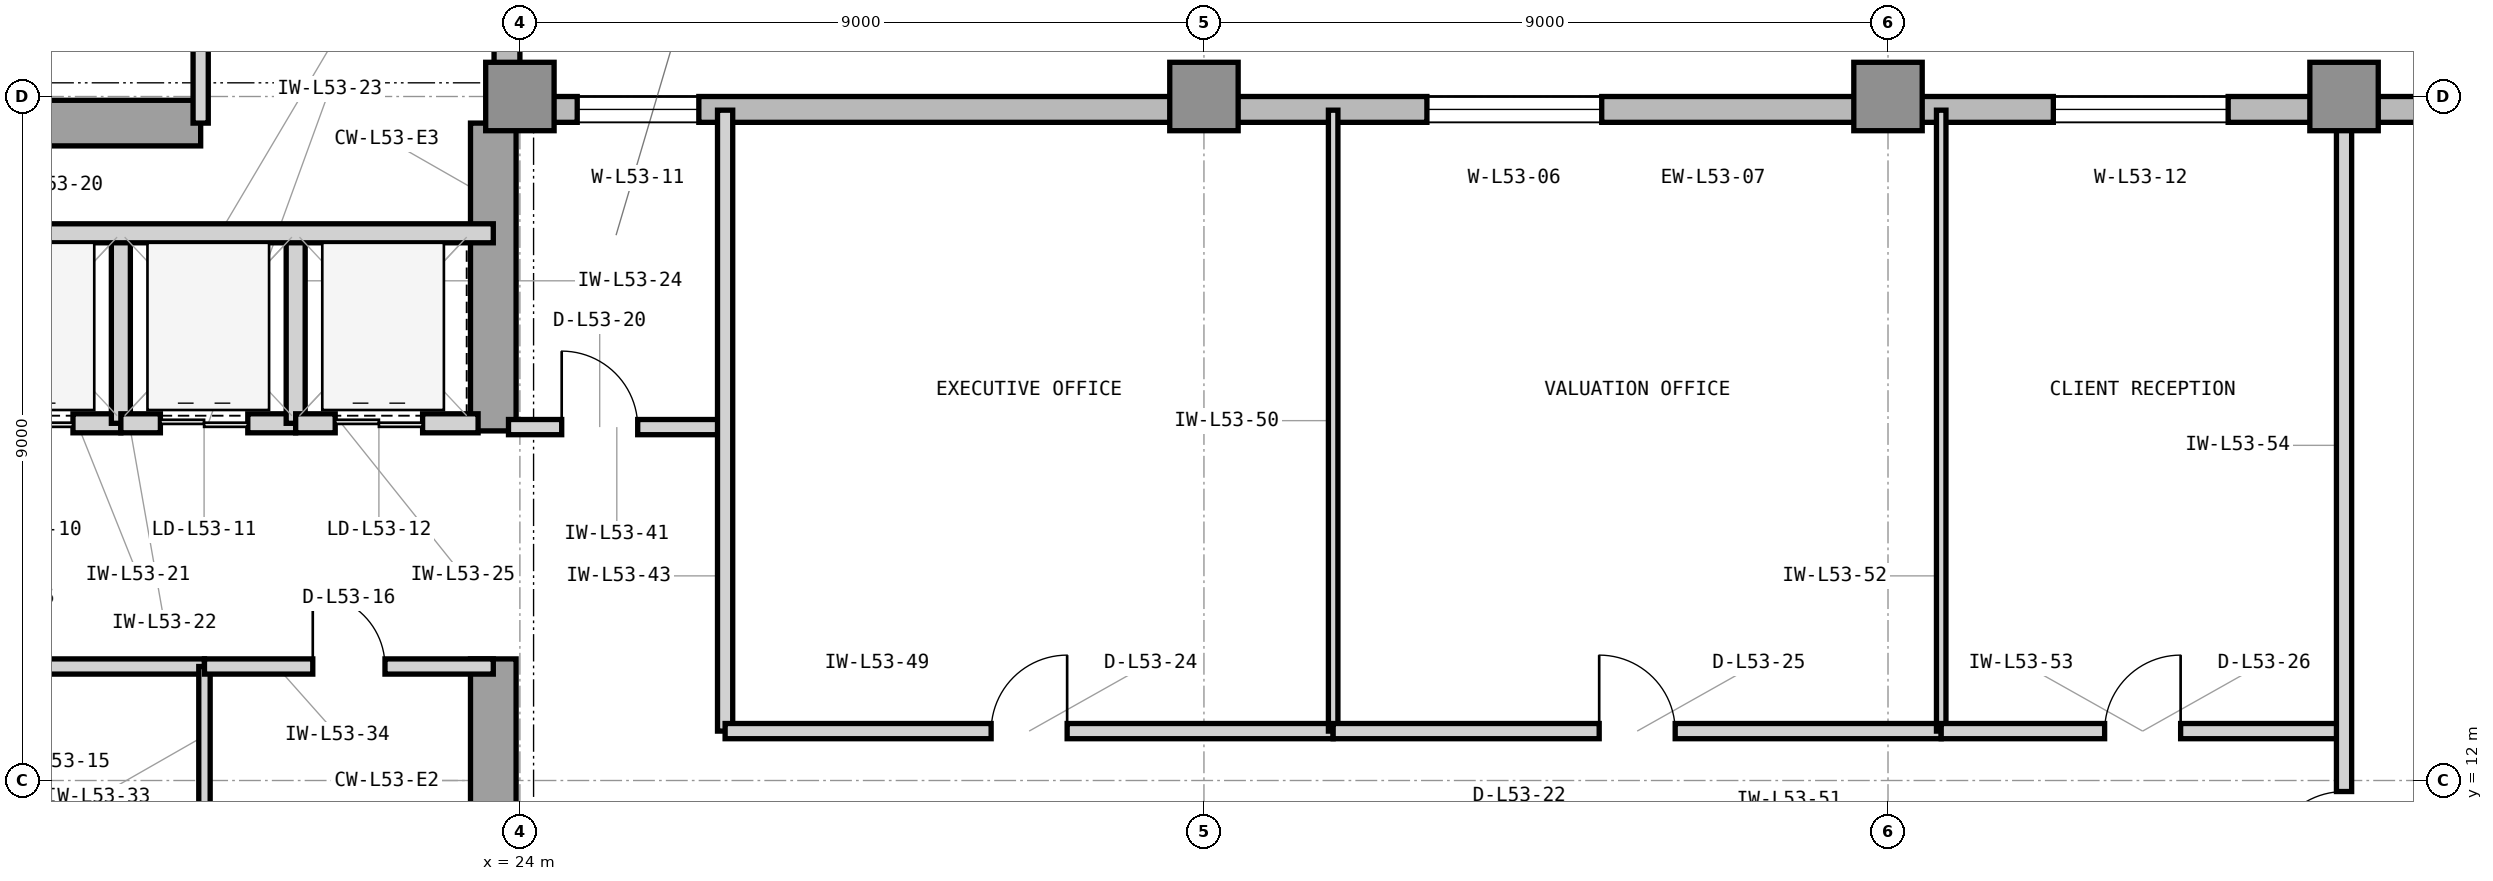
"""IFC4 building model, lengths in metres.
Left out: names, types, materials, properties, quantities, classifications, styles, units other than length and angle.
Written with IfcOpenShell. Run it as: python <this file> out.ifc"""

import sys

from ifc_helpers import new_model, si_unit, direction, frame, frame_2d, origin, origin_2d, place, context, subcontext, project, spatial, rectangle, extrude, element, fill, save


model = new_model("IFC4")
c1 = context("Model", 3, precision=1e-05, world=origin(), true_north=direction((0.0, 1.0)))
c2 = subcontext(c1, "Body", "Model", "MODEL_VIEW")
j1 = project(units=[si_unit("LENGTHUNIT", "METRE"), si_unit("PLANEANGLEUNIT", "RADIAN")], contexts=[c1])
p1 = place(None, origin())
s1 = spatial("IfcSite", under=j1, at=p1, CompositionType="ELEMENT")
p2 = place(p1, origin())
s2 = spatial("IfcBuilding", under=s1, at=p2, CompositionType="ELEMENT")
p3 = place(p2, frame((0.0, 0.0, 219.0)))
s3 = spatial("IfcBuildingStorey", under=s2, at=p3, CompositionType="ELEMENT", Elevation=219.0)
p4 = place(p3, frame((7.475, 20.65, 0.0), z_axis=(0.0, 0.0, 1.0), x_axis=(1.0, 0.0, 0.0)))
e1 = element("IfcWall", 1, at=p4, inside=s3, PredefinedType="SHEAR", context=c2, shape_type="SweptSolid", body=[
    extrude(rectangle(XDim=12.325, YDim=0.6, at=frame_2d((6.163, 0.0))), origin(), (0.0, 0.0, 1.0), 3.9),
])
p5 = place(p3, frame((23.65, 10.4, 0.0), z_axis=(0.0, 0.0, 1.0), x_axis=(0.0, 1.0, 0.0)))
e2 = element("IfcWall", 2, at=p5, inside=s3, PredefinedType="SHEAR", context=c2, shape_type="SweptSolid", body=[
    extrude(rectangle(XDim=3.2, YDim=0.6, at=frame_2d((1.6, 0.0))), origin(), (0.0, 0.0, 1.0), 3.9),
])
p6 = place(p3, frame((23.65, 16.6, 0.0), z_axis=(0.0, 0.0, 1.0), x_axis=(0.0, 1.0, 0.0)))
e3 = element("IfcWall", 3, at=p6, inside=s3, PredefinedType="SHEAR", context=c2, shape_type="SweptSolid", body=[
    extrude(rectangle(XDim=4.05, YDim=0.6, at=frame_2d((2.025, 0.0))), origin(), (0.0, 0.0, 1.0), 3.9),
])
for number, where, z_axis, x_axis in (
    (4, (24.0, 21.0, 0.0), (0.0, 0.0, 1.0), (1.0, 0.0, 0.0)),
    (5, (33.0, 21.0, 0.0), (0.0, 0.0, 1.0), (1.0, 0.0, 0.0)),
    (6, (42.0, 21.0, 0.0), (0.0, 0.0, 1.0), (1.0, 0.0, 0.0)),
    (7, (48.0, 21.0, 0.0), (0.0, 0.0, 1.0), (1.0, 0.0, 0.0)),
):
    element("IfcColumn", number, at=place(p3, frame(where, z_axis=z_axis, x_axis=x_axis)), inside=s3, PredefinedType="COLUMN", context=c2, shape_type="SweptSolid", body=[
        extrude(rectangle(XDim=0.9, YDim=0.9, at=origin_2d()), origin(), (0.0, 0.0, 1.0), 3.9),
    ])
p7 = place(p3, frame((55.4, 20.83, 0.0), z_axis=(0.0, 0.0, 1.0), x_axis=(-1.0, 0.0, 0.0)))
e8 = element("IfcWall", 8, at=p7, inside=s3, PredefinedType="STANDARD", context=c2, shape_type="SweptSolid", body=[
    extrude(rectangle(XDim=31.4, YDim=0.34, at=frame_2d((15.7, 0.0))), origin(), (0.0, 0.0, 1.0), 3.65),
])
p8 = place(p7, frame((17.167, 0.0, 0.9)))
e9 = element("IfcOpeningElement", 9, at=p8, cuts=e8, PredefinedType="OPENING", context=c2, shape_type="SweptSolid", body=[
    extrude(rectangle(XDim=2.3, YDim=2.2, at=frame_2d((1.15, 1.1))), frame((0.0, 0.18, 0.0), z_axis=(0.0, -1.0, 0.0), x_axis=(1.0, 0.0, 0.0)), (0.0, 0.0, 1.0), 0.36),
])
p9 = place(p7, frame((29.046, 0.0, 0.9)))
e10 = element("IfcOpeningElement", 10, at=p9, cuts=e8, PredefinedType="OPENING", context=c2, shape_type="SweptSolid", body=[
    extrude(rectangle(XDim=1.6, YDim=2.2, at=frame_2d((0.8, 1.1))), frame((0.0, 0.18, 0.0), z_axis=(0.0, -1.0, 0.0), x_axis=(1.0, 0.0, 0.0)), (0.0, 0.0, 1.0), 0.36),
])
p10 = place(p7, frame((8.925, 0.0, 0.9)))
e11 = element("IfcOpeningElement", 11, at=p10, cuts=e8, PredefinedType="OPENING", context=c2, shape_type="SweptSolid", body=[
    extrude(rectangle(XDim=2.3, YDim=2.2, at=frame_2d((1.15, 1.1))), frame((0.0, 0.18, 0.0), z_axis=(0.0, -1.0, 0.0), x_axis=(1.0, 0.0, 0.0)), (0.0, 0.0, 1.0), 0.36),
])
p11 = place(p3, frame((23.83, 21.0, 0.0), z_axis=(0.0, 0.0, 1.0), x_axis=(0.0, 1.0, 0.0)))
e12 = element("IfcWall", 12, at=p11, inside=s3, PredefinedType="STANDARD", context=c2, shape_type="SweptSolid", body=[
    extrude(rectangle(XDim=19.4, YDim=0.34, at=frame_2d((9.7, 0.0))), origin(), (0.0, 0.0, 1.0), 3.65),
])
p12 = place(p11, frame((10.975, 0.0, 0.9)))
e13 = element("IfcOpeningElement", 13, at=p12, cuts=e12, PredefinedType="OPENING", context=c2, shape_type="SweptSolid", body=[
    extrude(rectangle(XDim=2.3, YDim=2.2, at=frame_2d((1.15, 1.1))), frame((0.0, 0.18, 0.0), z_axis=(0.0, -1.0, 0.0), x_axis=(1.0, 0.0, 0.0)), (0.0, 0.0, 1.0), 0.36),
])
p13 = place(p3, frame((16.45, 16.7, 0.0), z_axis=(0.0, 0.0, 1.0), x_axis=(1.0, 0.0, 0.0)))
e14 = element("IfcWall", 14, at=p13, inside=s3, PredefinedType="PARTITIONING", context=c2, shape_type="SweptSolid", body=[
    extrude(rectangle(XDim=2.3, YDim=0.25, at=frame_2d((1.15, 0.0))), origin(), (0.0, 0.0, 1.0), 3.283),
])
p14 = place(p13, frame((0.52, 0.0, 0.0)))
e15 = element("IfcOpeningElement", 15, at=p14, cuts=e14, PredefinedType="OPENING", context=c2, shape_type="SweptSolid", body=[
    extrude(rectangle(XDim=1.15, YDim=2.25, at=frame_2d((0.575, 1.125))), frame((0.0, 0.135, 0.0), z_axis=(0.0, -1.0, 0.0), x_axis=(1.0, 0.0, 0.0)), (0.0, 0.0, 1.0), 0.27),
])
p15 = place(p3, frame((18.75, 16.7, 0.0), z_axis=(0.0, 0.0, 1.0), x_axis=(0.0, 1.0, 0.0)))
e16 = element("IfcWall", 16, at=p15, inside=s3, PredefinedType="PARTITIONING", context=c2, shape_type="SweptSolid", body=[
    extrude(rectangle(XDim=2.5, YDim=0.25, at=frame_2d((1.25, 0.0))), origin(), (0.0, 0.0, 1.0), 3.64),
])
p16 = place(p3, frame((18.75, 16.7, 0.0), z_axis=(0.0, 0.0, 1.0), x_axis=(1.0, 0.0, 0.0)))
e17 = element("IfcWall", 17, at=p16, inside=s3, PredefinedType="PARTITIONING", context=c2, shape_type="SweptSolid", body=[
    extrude(rectangle(XDim=2.3, YDim=0.25, at=frame_2d((1.15, 0.0))), origin(), (0.0, 0.0, 1.0), 3.283),
])
p17 = place(p16, frame((0.52, 0.0, 0.0)))
e18 = element("IfcOpeningElement", 18, at=p17, cuts=e17, PredefinedType="OPENING", context=c2, shape_type="SweptSolid", body=[
    extrude(rectangle(XDim=1.15, YDim=2.25, at=frame_2d((0.575, 1.125))), frame((0.0, 0.135, 0.0), z_axis=(0.0, -1.0, 0.0), x_axis=(1.0, 0.0, 0.0)), (0.0, 0.0, 1.0), 0.27),
])
p18 = place(p3, frame((21.05, 16.7, 0.0), z_axis=(0.0, 0.0, 1.0), x_axis=(0.0, 1.0, 0.0)))
e19 = element("IfcWall", 19, at=p18, inside=s3, PredefinedType="PARTITIONING", context=c2, shape_type="SweptSolid", body=[
    extrude(rectangle(XDim=2.5, YDim=0.25, at=frame_2d((1.25, 0.0))), origin(), (0.0, 0.0, 1.0), 3.64),
])
p19 = place(p3, frame((21.05, 16.7, 0.0), z_axis=(0.0, 0.0, 1.0), x_axis=(1.0, 0.0, 0.0)))
e20 = element("IfcWall", 20, at=p19, inside=s3, PredefinedType="PARTITIONING", context=c2, shape_type="SweptSolid", body=[
    extrude(rectangle(XDim=2.4, YDim=0.25, at=frame_2d((1.2, 0.0))), origin(), (0.0, 0.0, 1.0), 3.283),
])
p20 = place(p19, frame((0.52, 0.0, 0.0)))
e21 = element("IfcOpeningElement", 21, at=p20, cuts=e20, PredefinedType="OPENING", context=c2, shape_type="SweptSolid", body=[
    extrude(rectangle(XDim=1.15, YDim=2.25, at=frame_2d((0.575, 1.125))), frame((0.0, 0.135, 0.0), z_axis=(0.0, -1.0, 0.0), x_axis=(1.0, 0.0, 0.0)), (0.0, 0.0, 1.0), 0.27),
])
p21 = place(p3, frame((16.45, 19.2, 0.0), z_axis=(0.0, 0.0, 1.0), x_axis=(1.0, 0.0, 0.0)))
e22 = element("IfcWall", 22, at=p21, inside=s3, PredefinedType="PARTITIONING", context=c2, shape_type="SweptSolid", body=[
    extrude(rectangle(XDim=7.2, YDim=0.25, at=frame_2d((3.6, 0.0))), origin(), (0.0, 0.0, 1.0), 3.64),
])
p22 = place(p3, frame((14.7, 13.5, 0.0), z_axis=(0.0, 0.0, 1.0), x_axis=(1.0, 0.0, 0.0)))
e23 = element("IfcWall", 23, at=p22, inside=s3, PredefinedType="PARTITIONING", context=c2, shape_type="SweptSolid", body=[
    extrude(rectangle(XDim=5.15, YDim=0.2, at=frame_2d((2.575, 0.0))), origin(), (0.0, 0.0, 1.0), 3.283),
])
p23 = place(p22, frame((2.1, 0.0, 0.0)))
e24 = element("IfcOpeningElement", 24, at=p23, cuts=e23, PredefinedType="OPENING", context=c2, shape_type="SweptSolid", body=[
    extrude(rectangle(XDim=0.95, YDim=2.1, at=frame_2d((0.475, 1.05))), frame((0.0, 0.11, 0.0), z_axis=(0.0, -1.0, 0.0), x_axis=(1.0, 0.0, 0.0)), (0.0, 0.0, 1.0), 0.22),
])
p24 = place(p3, frame((19.85, 9.85, 0.0), z_axis=(0.0, 0.0, 1.0), x_axis=(0.0, 1.0, 0.0)))
e25 = element("IfcWall", 25, at=p24, inside=s3, PredefinedType="PARTITIONING", context=c2, shape_type="SweptSolid", body=[
    extrude(rectangle(XDim=3.65, YDim=0.15, at=frame_2d((1.825, 0.0))), origin(), (0.0, 0.0, 1.0), 3.64),
])
p25 = place(p3, frame((19.85, 13.5, 0.0), z_axis=(0.0, 0.0, 1.0), x_axis=(1.0, 0.0, 0.0)))
e26 = element("IfcWall", 26, at=p25, inside=s3, PredefinedType="PARTITIONING", context=c2, shape_type="SweptSolid", body=[
    extrude(rectangle(XDim=3.8, YDim=0.2, at=frame_2d((1.9, 0.0))), origin(), (0.0, 0.0, 1.0), 3.283),
])
p26 = place(p25, frame((1.425, 0.0, 0.0)))
e27 = element("IfcOpeningElement", 27, at=p26, cuts=e26, PredefinedType="OPENING", context=c2, shape_type="SweptSolid", body=[
    extrude(rectangle(XDim=0.95, YDim=2.1, at=frame_2d((0.475, 1.05))), frame((0.0, 0.11, 0.0), z_axis=(0.0, -1.0, 0.0), x_axis=(1.0, 0.0, 0.0)), (0.0, 0.0, 1.0), 0.22),
])
p27 = place(p3, frame((23.85, 16.65, 0.0), z_axis=(0.0, 0.0, 1.0), x_axis=(1.0, 0.0, 0.0)))
e28 = element("IfcWall", 28, at=p27, inside=s3, PredefinedType="PARTITIONING", context=c2, shape_type="SweptSolid", body=[
    extrude(rectangle(XDim=2.85, YDim=0.2, at=frame_2d((1.425, 0.0))), origin(), (0.0, 0.0, 1.0), 3.64),
])
p28 = place(p27, frame((0.7, 0.0, 0.0)))
e29 = element("IfcOpeningElement", 29, at=p28, cuts=e28, PredefinedType="OPENING", context=c2, shape_type="SweptSolid", body=[
    extrude(rectangle(XDim=1.0, YDim=2.15, at=frame_2d((0.5, 1.075))), frame((0.0, 0.11, 0.0), z_axis=(0.0, -1.0, 0.0), x_axis=(1.0, 0.0, 0.0)), (0.0, 0.0, 1.0), 0.22),
])
p29 = place(p3, frame((26.7, 12.65, 0.0), z_axis=(0.0, 0.0, 1.0), x_axis=(0.0, 1.0, 0.0)))
e30 = element("IfcWall", 30, at=p29, inside=s3, PredefinedType="PARTITIONING", context=c2, shape_type="SweptSolid", body=[
    extrude(rectangle(XDim=8.17, YDim=0.2, at=frame_2d((4.085, 0.0))), origin(), (0.0, 0.0, 1.0), 3.64),
])
p30 = place(p3, frame((26.7, 12.65, 0.0), z_axis=(0.0, 0.0, 1.0), x_axis=(1.0, 0.0, 0.0)))
e31 = element("IfcWall", 31, at=p30, inside=s3, PredefinedType="PARTITIONING", context=c2, shape_type="SweptSolid", body=[
    extrude(rectangle(XDim=8.0, YDim=0.2, at=frame_2d((4.0, 0.0))), origin(), (0.0, 0.0, 1.0), 3.64),
])
p31 = place(p30, frame((3.5, 0.0, 0.0)))
e32 = element("IfcOpeningElement", 32, at=p31, cuts=e31, PredefinedType="OPENING", context=c2, shape_type="SweptSolid", body=[
    extrude(rectangle(XDim=1.0, YDim=2.15, at=frame_2d((0.5, 1.075))), frame((0.0, 0.11, 0.0), z_axis=(0.0, -1.0, 0.0), x_axis=(1.0, 0.0, 0.0)), (0.0, 0.0, 1.0), 0.22),
])
p32 = place(p3, frame((34.7, 12.65, 0.0), z_axis=(0.0, 0.0, 1.0), x_axis=(0.0, 1.0, 0.0)))
e33 = element("IfcWall", 33, at=p32, inside=s3, PredefinedType="PARTITIONING", context=c2, shape_type="SweptSolid", body=[
    extrude(rectangle(XDim=8.17, YDim=0.125, at=frame_2d((4.085, 0.0))), origin(), (0.0, 0.0, 1.0), 3.64),
])
p33 = place(p3, frame((34.7, 12.65, 0.0), z_axis=(0.0, 0.0, 1.0), x_axis=(1.0, 0.0, 0.0)))
e34 = element("IfcWall", 34, at=p33, inside=s3, PredefinedType="PARTITIONING", context=c2, shape_type="SweptSolid", body=[
    extrude(rectangle(XDim=8.0, YDim=0.2, at=frame_2d((4.0, 0.0))), origin(), (0.0, 0.0, 1.0), 3.64),
])
p34 = place(p33, frame((3.5, 0.0, 0.0)))
e35 = element("IfcOpeningElement", 35, at=p34, cuts=e34, PredefinedType="OPENING", context=c2, shape_type="SweptSolid", body=[
    extrude(rectangle(XDim=1.0, YDim=2.15, at=frame_2d((0.5, 1.075))), frame((0.0, 0.11, 0.0), z_axis=(0.0, -1.0, 0.0), x_axis=(1.0, 0.0, 0.0)), (0.0, 0.0, 1.0), 0.22),
])
p35 = place(p3, frame((42.7, 12.65, 0.0), z_axis=(0.0, 0.0, 1.0), x_axis=(0.0, 1.0, 0.0)))
e36 = element("IfcWall", 36, at=p35, inside=s3, PredefinedType="PARTITIONING", context=c2, shape_type="SweptSolid", body=[
    extrude(rectangle(XDim=8.17, YDim=0.125, at=frame_2d((4.085, 0.0))), origin(), (0.0, 0.0, 1.0), 3.64),
])
p36 = place(p3, frame((42.7, 12.65, 0.0), z_axis=(0.0, 0.0, 1.0), x_axis=(1.0, 0.0, 0.0)))
e37 = element("IfcWall", 37, at=p36, inside=s3, PredefinedType="PARTITIONING", context=c2, shape_type="SweptSolid", body=[
    extrude(rectangle(XDim=5.3, YDim=0.2, at=frame_2d((2.65, 0.0))), origin(), (0.0, 0.0, 1.0), 3.64),
])
p37 = place(p36, frame((2.15, 0.0, 0.0)))
e38 = element("IfcOpeningElement", 38, at=p37, cuts=e37, PredefinedType="OPENING", context=c2, shape_type="SweptSolid", body=[
    extrude(rectangle(XDim=1.0, YDim=2.15, at=frame_2d((0.5, 1.075))), frame((0.0, 0.11, 0.0), z_axis=(0.0, -1.0, 0.0), x_axis=(1.0, 0.0, 0.0)), (0.0, 0.0, 1.0), 0.22),
])
p38 = place(p3, frame((48.0, 3.18, 0.0), z_axis=(0.0, 0.0, 1.0), x_axis=(0.0, 1.0, 0.0)))
e39 = element("IfcWall", 39, at=p38, inside=s3, PredefinedType="PARTITIONING", context=c2, shape_type="SweptSolid", body=[
    extrude(rectangle(XDim=17.64, YDim=0.2, at=frame_2d((8.82, 0.0))), origin(), (0.0, 0.0, 1.0), 3.073),
])
p39 = place(p38, frame((7.675, 0.0, 0.0)))
e40 = element("IfcOpeningElement", 40, at=p39, cuts=e39, PredefinedType="OPENING", context=c2, shape_type="SweptSolid", body=[
    extrude(rectangle(XDim=1.0, YDim=2.15, at=frame_2d((0.5, 1.075))), frame((0.0, 0.11, 0.0), z_axis=(0.0, -1.0, 0.0), x_axis=(1.0, 0.0, 0.0)), (0.0, 0.0, 1.0), 0.22),
])
p40 = place(p3, frame((19.8, 20.65, 0.0), z_axis=(0.0, 0.0, 1.0), x_axis=(0.0, 1.0, 0.0)))
e41 = element("IfcWall", 41, at=p40, inside=s3, PredefinedType="PARTITIONING", context=c2, shape_type="SweptSolid", body=[
    extrude(rectangle(XDim=6.15, YDim=0.2, at=frame_2d((3.075, 0.0))), origin(), (0.0, 0.0, 1.0), 3.64),
])
p41 = place(p8, origin())
e42 = element("IfcWindow", 42, at=p41, inside=s3, PartitioningType="SINGLE_PANEL", PredefinedType="WINDOW", context=c2, shape_type="SweptSolid", body=[
    extrude(rectangle(XDim=2.3, YDim=2.2, at=frame_2d((1.15, 1.1))), frame((0.0, 0.11, 0.0), z_axis=(0.0, -1.0, 0.0), x_axis=(1.0, 0.0, 0.0)), (0.0, 0.0, 1.0), 0.06),
])
fill(e9, e42)
p42 = place(p14, origin())
e43 = element("IfcDoor", 43, at=p42, inside=s3, OperationType="DOUBLE_DOOR_SLIDING", PredefinedType="DOOR", context=c2, shape_type="SweptSolid", body=[
    extrude(rectangle(XDim=1.15, YDim=2.25, at=frame_2d((0.575, 1.125))), frame((0.0, 0.025, 0.0), z_axis=(0.0, -1.0, 0.0), x_axis=(1.0, 0.0, 0.0)), (0.0, 0.0, 1.0), 0.05),
])
fill(e15, e43)
p43 = place(p17, origin())
e44 = element("IfcDoor", 44, at=p43, inside=s3, OperationType="DOUBLE_DOOR_SLIDING", PredefinedType="DOOR", context=c2, shape_type="SweptSolid", body=[
    extrude(rectangle(XDim=1.15, YDim=2.25, at=frame_2d((0.575, 1.125))), frame((0.0, 0.025, 0.0), z_axis=(0.0, -1.0, 0.0), x_axis=(1.0, 0.0, 0.0)), (0.0, 0.0, 1.0), 0.05),
])
fill(e18, e44)
p44 = place(p20, origin())
e45 = element("IfcDoor", 45, at=p44, inside=s3, OperationType="DOUBLE_DOOR_SLIDING", PredefinedType="DOOR", context=c2, shape_type="SweptSolid", body=[
    extrude(rectangle(XDim=1.15, YDim=2.25, at=frame_2d((0.575, 1.125))), frame((0.0, 0.025, 0.0), z_axis=(0.0, -1.0, 0.0), x_axis=(1.0, 0.0, 0.0)), (0.0, 0.0, 1.0), 0.05),
])
fill(e21, e45)
p45 = place(p26, origin())
e46 = element("IfcDoor", 46, at=p45, inside=s3, OperationType="SINGLE_SWING_LEFT", PredefinedType="DOOR", context=c2, shape_type="SweptSolid", body=[
    extrude(rectangle(XDim=0.95, YDim=2.1, at=frame_2d((0.475, 1.05))), frame((0.0, 0.025, 0.0), z_axis=(0.0, -1.0, 0.0), x_axis=(1.0, 0.0, 0.0)), (0.0, 0.0, 1.0), 0.05),
])
fill(e27, e46)
p46 = place(p28, origin())
e47 = element("IfcDoor", 47, at=p46, inside=s3, OperationType="SINGLE_SWING_LEFT", PredefinedType="DOOR", context=c2, shape_type="SweptSolid", body=[
    extrude(rectangle(XDim=1.0, YDim=2.15, at=frame_2d((0.5, 1.075))), frame((0.0, 0.025, 0.0), z_axis=(0.0, -1.0, 0.0), x_axis=(1.0, 0.0, 0.0)), (0.0, 0.0, 1.0), 0.05),
])
fill(e29, e47)
p47 = place(p31, origin())
e48 = element("IfcDoor", 48, at=p47, inside=s3, OperationType="SINGLE_SWING_RIGHT", PredefinedType="DOOR", context=c2, shape_type="SweptSolid", body=[
    extrude(rectangle(XDim=1.0, YDim=2.15, at=frame_2d((0.5, 1.075))), frame((0.0, 0.025, 0.0), z_axis=(0.0, -1.0, 0.0), x_axis=(1.0, 0.0, 0.0)), (0.0, 0.0, 1.0), 0.05),
])
fill(e32, e48)
p48 = place(p34, origin())
e49 = element("IfcDoor", 49, at=p48, inside=s3, OperationType="SINGLE_SWING_LEFT", PredefinedType="DOOR", context=c2, shape_type="SweptSolid", body=[
    extrude(rectangle(XDim=1.0, YDim=2.15, at=frame_2d((0.5, 1.075))), frame((0.0, 0.025, 0.0), z_axis=(0.0, -1.0, 0.0), x_axis=(1.0, 0.0, 0.0)), (0.0, 0.0, 1.0), 0.05),
])
fill(e35, e49)
p49 = place(p37, origin())
e50 = element("IfcDoor", 50, at=p49, inside=s3, OperationType="SINGLE_SWING_RIGHT", PredefinedType="DOOR", context=c2, shape_type="SweptSolid", body=[
    extrude(rectangle(XDim=1.0, YDim=2.15, at=frame_2d((0.5, 1.075))), frame((0.0, 0.025, 0.0), z_axis=(0.0, -1.0, 0.0), x_axis=(1.0, 0.0, 0.0)), (0.0, 0.0, 1.0), 0.05),
])
fill(e38, e50)
p50 = place(p39, origin())
e51 = element("IfcDoor", 51, at=p50, inside=s3, OperationType="SINGLE_SWING_LEFT", PredefinedType="DOOR", context=c2, shape_type="SweptSolid", body=[
    extrude(rectangle(XDim=1.0, YDim=2.15, at=frame_2d((0.5, 1.075))), frame((0.0, 0.025, 0.0), z_axis=(0.0, -1.0, 0.0), x_axis=(1.0, 0.0, 0.0)), (0.0, 0.0, 1.0), 0.05),
])
fill(e40, e51)
p51 = place(p9, origin())
e52 = element("IfcWindow", 52, at=p51, inside=s3, PartitioningType="SINGLE_PANEL", PredefinedType="WINDOW", context=c2, shape_type="SweptSolid", body=[
    extrude(rectangle(XDim=1.6, YDim=2.2, at=frame_2d((0.8, 1.1))), frame((0.0, 0.11, 0.0), z_axis=(0.0, -1.0, 0.0), x_axis=(1.0, 0.0, 0.0)), (0.0, 0.0, 1.0), 0.06),
])
fill(e10, e52)
p52 = place(p10, origin())
e53 = element("IfcWindow", 53, at=p52, inside=s3, PartitioningType="SINGLE_PANEL", PredefinedType="WINDOW", context=c2, shape_type="SweptSolid", body=[
    extrude(rectangle(XDim=2.3, YDim=2.2, at=frame_2d((1.15, 1.1))), frame((0.0, 0.11, 0.0), z_axis=(0.0, -1.0, 0.0), x_axis=(1.0, 0.0, 0.0)), (0.0, 0.0, 1.0), 0.06),
])
fill(e11, e53)
save(model, sys.argv[1])
